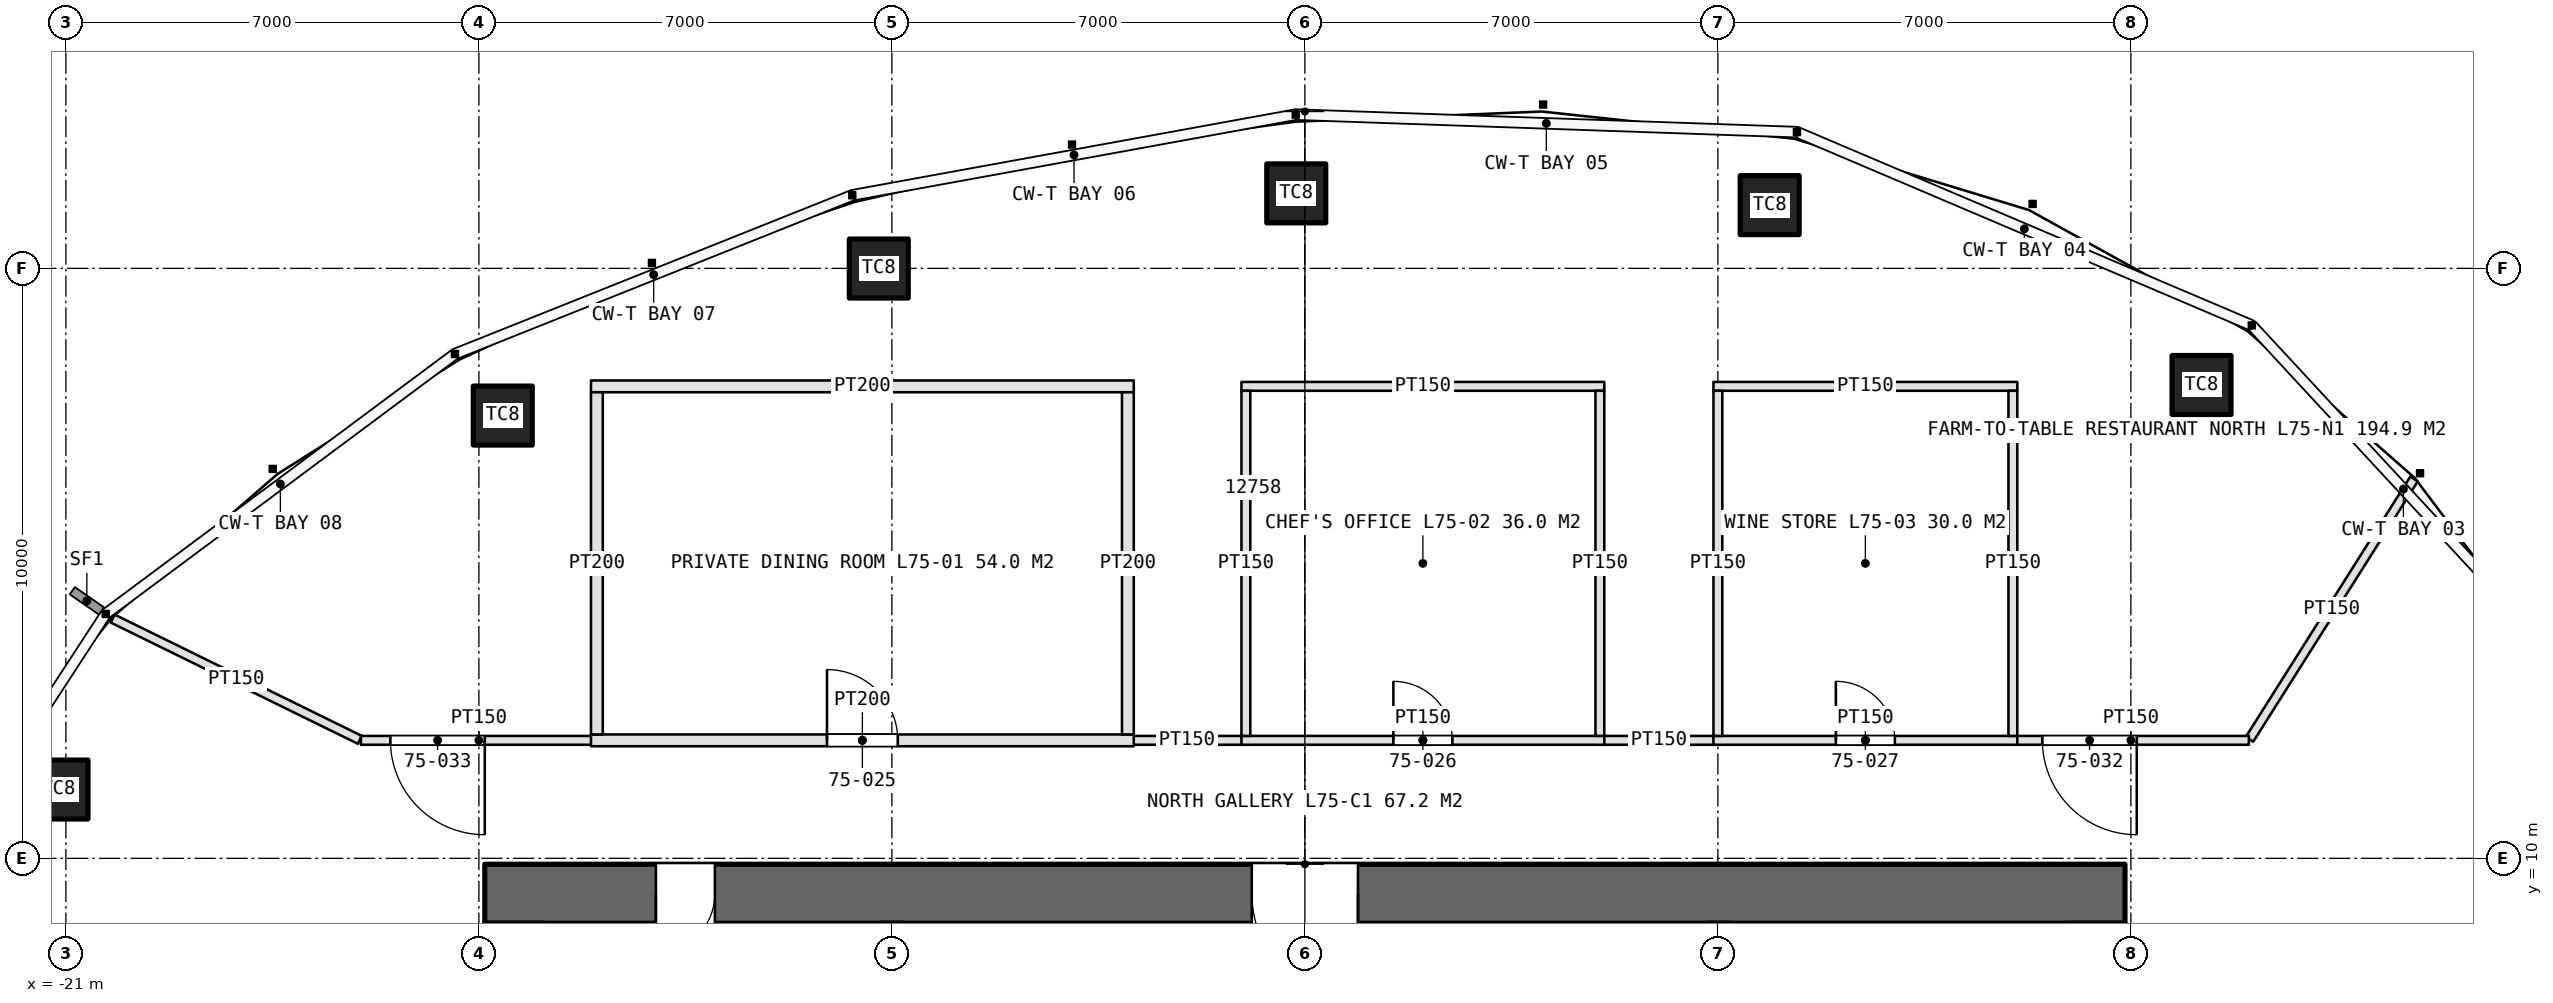
"""IFC4 building model, lengths in metres.
Left out: names, types, materials, properties, quantities, classifications, styles, units other than length and angle.
Written with IfcOpenShell. Run it as: python <this file> out.ifc"""

import sys

from ifc_helpers import new_model, si_unit, direction, frame, frame_2d, origin, origin_2d, place, context, subcontext, project, spatial, rectangle, extrude, element, fill, save


model = new_model("IFC4")
c1 = context("Model", 3, precision=1e-05, world=origin(), true_north=direction((0.0, 1.0)))
c2 = subcontext(c1, "Body", "Model", "MODEL_VIEW")
j1 = project(units=[si_unit("LENGTHUNIT", "METRE"), si_unit("PLANEANGLEUNIT", "RADIAN")], contexts=[c1])
p1 = place(None, origin())
s1 = spatial("IfcSite", under=j1, at=p1, CompositionType="ELEMENT")
p2 = place(p1, origin())
s2 = spatial("IfcBuilding", under=s1, at=p2, CompositionType="ELEMENT")
p3 = place(p2, frame((0.0, 0.0, 334.2)))
s3 = spatial("IfcBuildingStorey", under=s2, at=p3, CompositionType="ELEMENT", Elevation=334.2)
p4 = place(p3, frame((13.9, 9.4, 0.0), z_axis=(0.0, 0.0, 1.0), x_axis=(-1.0, 0.0, 0.0)))
e1 = element("IfcWall", 1, at=p4, inside=s3, PredefinedType="SHEAR", context=c2, shape_type="SweptSolid", body=[
    extrude(rectangle(XDim=27.8, YDim=1.0, at=frame_2d((13.9, 0.0))), origin(), (0.0, 0.0, 1.0), 5.0),
])
p5 = place(p4, frame((23.9, 0.0, 0.0)))
e2 = element("IfcOpeningElement", 2, at=p5, cuts=e1, PredefinedType="OPENING", context=c2, shape_type="SweptSolid", body=[
    extrude(rectangle(XDim=1.0, YDim=2.4, at=frame_2d((0.5, 1.2))), frame((0.0, 0.51, 0.0), z_axis=(0.0, -1.0, 0.0), x_axis=(1.0, 0.0, 0.0)), (0.0, 0.0, 1.0), 1.02),
])
p6 = place(p4, frame((13.0, 0.0, 0.0)))
e3 = element("IfcOpeningElement", 3, at=p6, cuts=e1, PredefinedType="OPENING", context=c2, shape_type="SweptSolid", body=[
    extrude(rectangle(XDim=1.8, YDim=2.4, at=frame_2d((0.9, 1.2))), frame((0.0, 0.51, 0.0), z_axis=(0.0, -1.0, 0.0), x_axis=(1.0, 0.0, 0.0)), (0.0, 0.0, 1.0), 1.02),
])
for number, where, z_axis, x_axis in (
    (4, (15.198, 18.023, 0.0), (0.0, 0.0, 1.0), (1.0, 0.0, 0.0)),
    (5, (7.878, 21.072, 0.0), (0.0, 0.0, 1.0), (1.0, 0.0, 0.0)),
    (6, (-0.146, 21.271, 0.0), (0.0, 0.0, 1.0), (1.0, 0.0, 0.0)),
    (7, (-7.222, 19.997, 0.0), (0.0, 0.0, 1.0), (1.0, 0.0, 0.0)),
    (8, (-13.595, 17.505, 0.0), (0.0, 0.0, 1.0), (1.0, 0.0, 0.0)),
    (9, (-21.125, 11.166, 0.0), (0.0, 0.0, 1.0), (1.0, 0.0, 0.0)),
):
    element("IfcColumn", number, at=place(p3, frame(where, z_axis=z_axis, x_axis=x_axis)), inside=s3, PredefinedType="COLUMN", context=c2, shape_type="SweptSolid", body=[
        extrude(rectangle(XDim=1.0, YDim=1.0, at=origin_2d()), origin(), (0.0, 0.0, 1.0), 5.0),
    ])
p7 = place(p3, frame((-16.018, 12.009, 0.0), z_axis=(0.0, 0.0, 1.0), x_axis=(-0.897771840996, 0.440460805879, 0.0)))
e10 = element("IfcWall", 10, at=p7, inside=s3, PredefinedType="PARTITIONING", context=c2, shape_type="SweptSolid", body=[
    extrude(rectangle(XDim=4.666, YDim=0.15, at=frame_2d((2.333, 0.0))), origin(), (0.0, 0.0, 1.0), 3.4),
])
p8 = place(p3, frame((16.011, 12.017, 0.0), z_axis=(0.0, 0.0, 1.0), x_axis=(0.53415837449, 0.845384427916, 0.0)))
e11 = element("IfcWall", 11, at=p8, inside=s3, PredefinedType="PARTITIONING", context=c2, shape_type="SweptSolid", body=[
    extrude(rectangle(XDim=5.22, YDim=0.15, at=frame_2d((2.61, 0.0))), origin(), (0.0, 0.0, 1.0), 3.4),
])
p9 = place(p3, frame((-12.0, 12.0, 0.0), z_axis=(0.0, 0.0, 1.0), x_axis=(-1.0, 0.0, 0.0)))
e12 = element("IfcWall", 12, at=p9, inside=s3, PredefinedType="PARTITIONING", context=c2, shape_type="SweptSolid", body=[
    extrude(rectangle(XDim=4.0, YDim=0.15, at=frame_2d((2.0, 0.0))), origin(), (0.0, 0.0, 1.0), 3.4),
])
p10 = place(p9, frame((1.9, 0.0, 0.0)))
e13 = element("IfcOpeningElement", 13, at=p10, cuts=e12, PredefinedType="OPENING", context=c2, shape_type="SweptSolid", body=[
    extrude(rectangle(XDim=1.6, YDim=2.4, at=frame_2d((0.8, 1.2))), frame((0.0, 0.085, 0.0), z_axis=(0.0, -1.0, 0.0), x_axis=(1.0, 0.0, 0.0)), (0.0, 0.0, 1.0), 0.17),
])
for number, where, z_axis, x_axis in (
    (14, (-1.0, 12.0, 0.0), (0.0, 0.0, 1.0), (-1.0, 0.0, 0.0)),
    (15, (7.0, 12.0, 0.0), (0.0, 0.0, 1.0), (-1.0, 0.0, 0.0)),
):
    element("IfcWall", number, at=place(p3, frame(where, z_axis=z_axis, x_axis=x_axis)), inside=s3, PredefinedType="PARTITIONING", context=c2, shape_type="SweptSolid", body=[
        extrude(rectangle(XDim=2.0, YDim=0.15, at=frame_2d((1.0, 0.0))), origin(), (0.0, 0.0, 1.0), 3.4),
    ])
p11 = place(p3, frame((16.0, 12.0, 0.0), z_axis=(0.0, 0.0, 1.0), x_axis=(-1.0, 0.0, 0.0)))
e16 = element("IfcWall", 16, at=p11, inside=s3, PredefinedType="PARTITIONING", context=c2, shape_type="SweptSolid", body=[
    extrude(rectangle(XDim=4.0, YDim=0.15, at=frame_2d((2.0, 0.0))), origin(), (0.0, 0.0, 1.0), 3.4),
])
p12 = place(p11, frame((1.9, 0.0, 0.0)))
e17 = element("IfcOpeningElement", 17, at=p12, cuts=e16, PredefinedType="OPENING", context=c2, shape_type="SweptSolid", body=[
    extrude(rectangle(XDim=1.6, YDim=2.4, at=frame_2d((0.8, 1.2))), frame((0.0, 0.085, 0.0), z_axis=(0.0, -1.0, 0.0), x_axis=(1.0, 0.0, 0.0)), (0.0, 0.0, 1.0), 0.17),
])
p13 = place(p3, frame((-12.1, 12.0, 0.0), z_axis=(0.0, 0.0, 1.0), x_axis=(1.0, 0.0, 0.0)))
e18 = element("IfcWall", 18, at=p13, inside=s3, PredefinedType="PARTITIONING", context=c2, shape_type="SweptSolid", body=[
    extrude(rectangle(XDim=9.2, YDim=0.2, at=frame_2d((4.6, 0.0))), origin(), (0.0, 0.0, 1.0), 3.4),
])
p14 = place(p13, frame((4.0, 0.0, 0.0)))
e19 = element("IfcOpeningElement", 19, at=p14, cuts=e18, PredefinedType="OPENING", context=c2, shape_type="SweptSolid", body=[
    extrude(rectangle(XDim=1.2, YDim=2.4, at=frame_2d((0.6, 1.2))), frame((0.0, 0.11, 0.0), z_axis=(0.0, -1.0, 0.0), x_axis=(1.0, 0.0, 0.0)), (0.0, 0.0, 1.0), 0.22),
])
p15 = place(p3, frame((-12.1, 18.0, 0.0), z_axis=(0.0, 0.0, 1.0), x_axis=(1.0, 0.0, 0.0)))
e20 = element("IfcWall", 20, at=p15, inside=s3, PredefinedType="PARTITIONING", context=c2, shape_type="SweptSolid", body=[
    extrude(rectangle(XDim=9.2, YDim=0.2, at=frame_2d((4.6, 0.0))), origin(), (0.0, 0.0, 1.0), 3.4),
])
for number, where, z_axis, x_axis in (
    (21, (-12.0, 12.1, 0.0), (0.0, 0.0, 1.0), (0.0, 1.0, 0.0)),
    (22, (-3.0, 12.1, 0.0), (0.0, 0.0, 1.0), (0.0, 1.0, 0.0)),
):
    element("IfcWall", number, at=place(p3, frame(where, z_axis=z_axis, x_axis=x_axis)), inside=s3, PredefinedType="PARTITIONING", context=c2, shape_type="SweptSolid", body=[
        extrude(rectangle(XDim=5.8, YDim=0.2, at=frame_2d((2.9, 0.0))), origin(), (0.0, 0.0, 1.0), 3.4),
    ])
p16 = place(p3, frame((-1.075, 12.0, 0.0), z_axis=(0.0, 0.0, 1.0), x_axis=(1.0, 0.0, 0.0)))
e23 = element("IfcWall", 23, at=p16, inside=s3, PredefinedType="PARTITIONING", context=c2, shape_type="SweptSolid", body=[
    extrude(rectangle(XDim=6.15, YDim=0.15, at=frame_2d((3.075, 0.0))), origin(), (0.0, 0.0, 1.0), 3.4),
])
p17 = place(p16, frame((2.575, 0.0, 0.0)))
e24 = element("IfcOpeningElement", 24, at=p17, cuts=e23, PredefinedType="OPENING", context=c2, shape_type="SweptSolid", body=[
    extrude(rectangle(XDim=1.0, YDim=2.2, at=frame_2d((0.5, 1.1))), frame((0.0, 0.085, 0.0), z_axis=(0.0, -1.0, 0.0), x_axis=(1.0, 0.0, 0.0)), (0.0, 0.0, 1.0), 0.17),
])
p18 = place(p3, frame((-1.075, 18.0, 0.0), z_axis=(0.0, 0.0, 1.0), x_axis=(1.0, 0.0, 0.0)))
e25 = element("IfcWall", 25, at=p18, inside=s3, PredefinedType="PARTITIONING", context=c2, shape_type="SweptSolid", body=[
    extrude(rectangle(XDim=6.15, YDim=0.15, at=frame_2d((3.075, 0.0))), origin(), (0.0, 0.0, 1.0), 3.4),
])
for number, where, z_axis, x_axis in (
    (26, (-1.0, 12.075, 0.0), (0.0, 0.0, 1.0), (0.0, 1.0, 0.0)),
    (27, (5.0, 12.075, 0.0), (0.0, 0.0, 1.0), (0.0, 1.0, 0.0)),
):
    element("IfcWall", number, at=place(p3, frame(where, z_axis=z_axis, x_axis=x_axis)), inside=s3, PredefinedType="PARTITIONING", context=c2, shape_type="SweptSolid", body=[
        extrude(rectangle(XDim=5.85, YDim=0.15, at=frame_2d((2.925, 0.0))), origin(), (0.0, 0.0, 1.0), 3.4),
    ])
p19 = place(p3, frame((6.925, 12.0, 0.0), z_axis=(0.0, 0.0, 1.0), x_axis=(1.0, 0.0, 0.0)))
e28 = element("IfcWall", 28, at=p19, inside=s3, PredefinedType="PARTITIONING", context=c2, shape_type="SweptSolid", body=[
    extrude(rectangle(XDim=5.15, YDim=0.15, at=frame_2d((2.575, 0.0))), origin(), (0.0, 0.0, 1.0), 3.4),
])
p20 = place(p19, frame((2.075, 0.0, 0.0)))
e29 = element("IfcOpeningElement", 29, at=p20, cuts=e28, PredefinedType="OPENING", context=c2, shape_type="SweptSolid", body=[
    extrude(rectangle(XDim=1.0, YDim=2.2, at=frame_2d((0.5, 1.1))), frame((0.0, 0.085, 0.0), z_axis=(0.0, -1.0, 0.0), x_axis=(1.0, 0.0, 0.0)), (0.0, 0.0, 1.0), 0.17),
])
p21 = place(p3, frame((6.925, 18.0, 0.0), z_axis=(0.0, 0.0, 1.0), x_axis=(1.0, 0.0, 0.0)))
e30 = element("IfcWall", 30, at=p21, inside=s3, PredefinedType="PARTITIONING", context=c2, shape_type="SweptSolid", body=[
    extrude(rectangle(XDim=5.15, YDim=0.15, at=frame_2d((2.575, 0.0))), origin(), (0.0, 0.0, 1.0), 3.4),
])
for number, where, z_axis, x_axis in (
    (31, (7.0, 12.075, 0.0), (0.0, 0.0, 1.0), (0.0, 1.0, 0.0)),
    (32, (12.0, 12.075, 0.0), (0.0, 0.0, 1.0), (0.0, 1.0, 0.0)),
):
    element("IfcWall", number, at=place(p3, frame(where, z_axis=z_axis, x_axis=x_axis)), inside=s3, PredefinedType="PARTITIONING", context=c2, shape_type="SweptSolid", body=[
        extrude(rectangle(XDim=5.85, YDim=0.15, at=frame_2d((2.925, 0.0))), origin(), (0.0, 0.0, 1.0), 3.4),
    ])
p22 = place(p5, origin())
e33 = element("IfcDoor", 33, at=p22, inside=s3, OperationType="SINGLE_SWING_RIGHT", PredefinedType="DOOR", context=c2, shape_type="SweptSolid", body=[
    extrude(rectangle(XDim=1.0, YDim=2.4, at=frame_2d((0.5, 1.2))), frame((0.0, 0.025, 0.0), z_axis=(0.0, -1.0, 0.0), x_axis=(1.0, 0.0, 0.0)), (0.0, 0.0, 1.0), 0.05),
])
fill(e2, e33)
p23 = place(p6, origin())
e34 = element("IfcDoor", 34, at=p23, inside=s3, OperationType="DOUBLE_DOOR_SINGLE_SWING", PredefinedType="DOOR", context=c2, shape_type="SweptSolid", body=[
    extrude(rectangle(XDim=1.8, YDim=2.4, at=frame_2d((0.9, 1.2))), frame((0.0, 0.025, 0.0), z_axis=(0.0, -1.0, 0.0), x_axis=(1.0, 0.0, 0.0)), (0.0, 0.0, 1.0), 0.05),
])
fill(e3, e34)
p24 = place(p14, origin())
e35 = element("IfcDoor", 35, at=p24, inside=s3, OperationType="SINGLE_SWING_LEFT", PredefinedType="DOOR", context=c2, shape_type="SweptSolid", body=[
    extrude(rectangle(XDim=1.2, YDim=2.4, at=frame_2d((0.6, 1.2))), frame((0.0, 0.025, 0.0), z_axis=(0.0, -1.0, 0.0), x_axis=(1.0, 0.0, 0.0)), (0.0, 0.0, 1.0), 0.05),
])
fill(e19, e35)
p25 = place(p17, origin())
e36 = element("IfcDoor", 36, at=p25, inside=s3, OperationType="SINGLE_SWING_LEFT", PredefinedType="DOOR", context=c2, shape_type="SweptSolid", body=[
    extrude(rectangle(XDim=1.0, YDim=2.2, at=frame_2d((0.5, 1.1))), frame((0.0, 0.025, 0.0), z_axis=(0.0, -1.0, 0.0), x_axis=(1.0, 0.0, 0.0)), (0.0, 0.0, 1.0), 0.05),
])
fill(e24, e36)
p26 = place(p20, origin())
e37 = element("IfcDoor", 37, at=p26, inside=s3, OperationType="SINGLE_SWING_LEFT", PredefinedType="DOOR", context=c2, shape_type="SweptSolid", body=[
    extrude(rectangle(XDim=1.0, YDim=2.2, at=frame_2d((0.5, 1.1))), frame((0.0, 0.025, 0.0), z_axis=(0.0, -1.0, 0.0), x_axis=(1.0, 0.0, 0.0)), (0.0, 0.0, 1.0), 0.05),
])
fill(e29, e37)
p27 = place(p12, origin())
e38 = element("IfcDoor", 38, at=p27, inside=s3, OperationType="DOUBLE_DOOR_SINGLE_SWING", PredefinedType="DOOR", context=c2, shape_type="SweptSolid", body=[
    extrude(rectangle(XDim=1.6, YDim=2.4, at=frame_2d((0.8, 1.2))), frame((0.0, 0.025, 0.0), z_axis=(0.0, -1.0, 0.0), x_axis=(1.0, 0.0, 0.0)), (0.0, 0.0, 1.0), 0.05),
])
fill(e17, e38)
p28 = place(p10, origin())
e39 = element("IfcDoor", 39, at=p28, inside=s3, OperationType="DOUBLE_DOOR_SINGLE_SWING", PredefinedType="DOOR", context=c2, shape_type="SweptSolid", body=[
    extrude(rectangle(XDim=1.6, YDim=2.4, at=frame_2d((0.8, 1.2))), frame((0.0, 0.025, 0.0), z_axis=(0.0, -1.0, 0.0), x_axis=(1.0, 0.0, 0.0)), (0.0, 0.0, 1.0), 0.05),
])
fill(e13, e39)
save(model, sys.argv[1])
